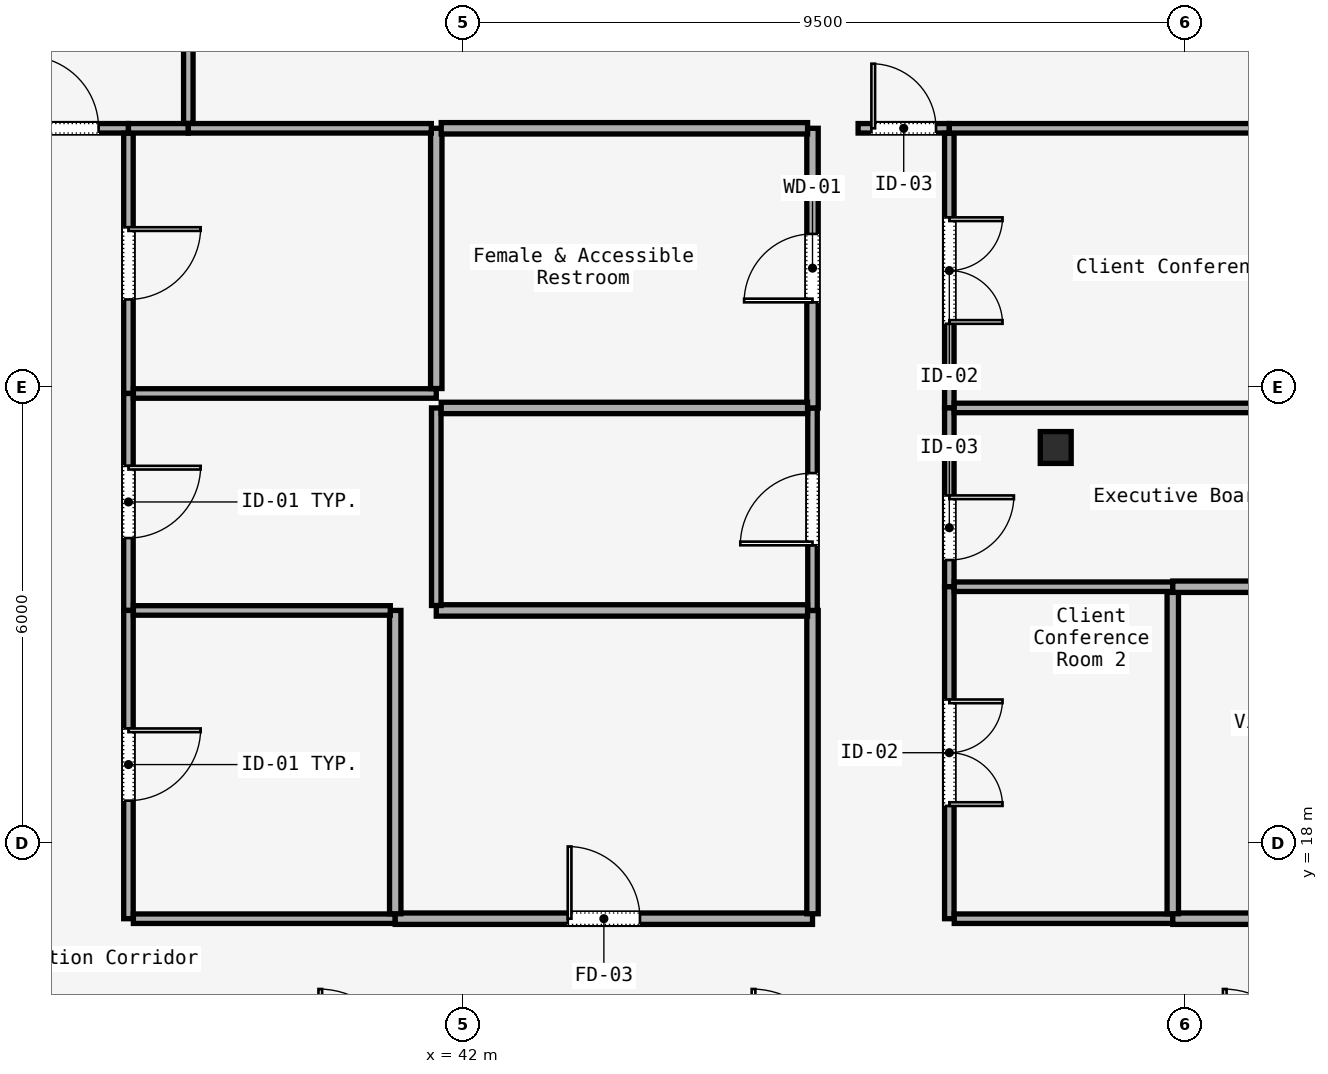
"""IFC4 building model, lengths in metres.
Left out: names, types, materials, properties, quantities, classifications, styles, units other than length and angle.
Written with IfcOpenShell. Run it as: python <this file> out.ifc"""

import sys

from ifc_helpers import new_model, si_unit, direction, frame, frame_2d, origin, origin_2d, place, context, subcontext, project, spatial, rectangle, i_section, extrude, element, fill, save


model = new_model("IFC4")
c1 = context("Model", 3, precision=1e-05, world=origin(), true_north=direction((0.0, 1.0)))
c2 = subcontext(c1, "Body", "Model", "MODEL_VIEW")
j1 = project(units=[si_unit("LENGTHUNIT", "METRE"), si_unit("PLANEANGLEUNIT", "RADIAN")], contexts=[c1])
p1 = place(None, origin())
s1 = spatial("IfcSite", under=j1, at=p1, CompositionType="ELEMENT")
p2 = place(p1, origin())
s2 = spatial("IfcBuilding", under=s1, at=p2, CompositionType="ELEMENT")
p3 = place(p2, frame((0.0, 0.0, 157.4)))
s3 = spatial("IfcBuildingStorey", under=s2, at=p3, CompositionType="ELEMENT", Elevation=157.4)
p4 = place(p3, frame((49.8, 23.2, 0.0), z_axis=(0.0, 0.0, 1.0), x_axis=(1.0, 0.0, 0.0)))
e1 = element("IfcColumn", 1, at=p4, inside=s3, PredefinedType="COLUMN", context=c2, shape_type="SweptSolid", body=[
    extrude(i_section(OverallWidth=0.407, OverallDepth=0.419, WebThickness=0.031, FlangeThickness=0.049, FilletRadius=0.015, at=origin_2d()), origin(), (0.0, 0.0, 1.0), 3.58),
])
p5 = place(p3, frame((35.865, 27.4, 0.0), z_axis=(0.0, 0.0, 1.0), x_axis=(1.0, 0.0, 0.0)))
e2 = element("IfcWall", 2, at=p5, inside=s3, PredefinedType="PARTITIONING", context=c2, shape_type="SweptSolid", body=[
    extrude(rectangle(XDim=1.735, YDim=0.125, at=frame_2d((0.868, 0.0))), origin(), (0.0, 0.0, 1.0), 3.01),
])
p6 = place(p5, frame((0.393, 0.0, 0.0)))
e3 = element("IfcOpeningElement", 3, at=p6, cuts=e2, PredefinedType="OPENING", context=c2, shape_type="SweptSolid", body=[
    extrude(rectangle(XDim=0.95, YDim=2.2, at=frame_2d((0.475, 1.1))), frame((0.0, 0.062, 0.0), z_axis=(0.0, -1.0, 0.0), x_axis=(1.0, 0.0, 0.0)), (0.0, 0.0, 1.0), 0.125),
])
p7 = place(p3, frame((37.6, 27.335, 0.0), z_axis=(0.0, 0.0, 1.0), x_axis=(0.0, -1.0, 0.0)))
e4 = element("IfcWall", 4, at=p7, inside=s3, PredefinedType="PARTITIONING", context=c2, shape_type="SweptSolid", body=[
    extrude(rectangle(XDim=3.424, YDim=0.125, at=frame_2d((1.712, 0.0))), origin(), (0.0, 0.0, 1.0), 3.01),
])
p8 = place(p7, frame((1.237, 0.0, 0.0)))
e5 = element("IfcOpeningElement", 5, at=p8, cuts=e4, PredefinedType="OPENING", context=c2, shape_type="SweptSolid", body=[
    extrude(rectangle(XDim=0.95, YDim=2.2, at=frame_2d((0.475, 1.1))), frame((0.0, 0.062, 0.0), z_axis=(0.0, -1.0, 0.0), x_axis=(1.0, 0.0, 0.0)), (0.0, 0.0, 1.0), 0.125),
])
p9 = place(p3, frame((37.6, 23.911, 0.0), z_axis=(0.0, 0.0, 1.0), x_axis=(0.0, -1.0, 0.0)))
e6 = element("IfcWall", 6, at=p9, inside=s3, PredefinedType="PARTITIONING", context=c2, shape_type="SweptSolid", body=[
    extrude(rectangle(XDim=2.855, YDim=0.125, at=frame_2d((1.427, 0.0))), origin(), (0.0, 0.0, 1.0), 3.01),
])
p10 = place(p9, frame((0.952, 0.0, 0.0)))
e7 = element("IfcOpeningElement", 7, at=p10, cuts=e6, PredefinedType="OPENING", context=c2, shape_type="SweptSolid", body=[
    extrude(rectangle(XDim=0.95, YDim=2.2, at=frame_2d((0.475, 1.1))), frame((0.0, 0.062, 0.0), z_axis=(0.0, -1.0, 0.0), x_axis=(1.0, 0.0, 0.0)), (0.0, 0.0, 1.0), 0.125),
])
p11 = place(p3, frame((37.6, 21.056, 0.0), z_axis=(0.0, 0.0, 1.0), x_axis=(0.0, -1.0, 0.0)))
e8 = element("IfcWall", 8, at=p11, inside=s3, PredefinedType="PARTITIONING", context=c2, shape_type="SweptSolid", body=[
    extrude(rectangle(XDim=4.056, YDim=0.125, at=frame_2d((2.028, 0.0))), origin(), (0.0, 0.0, 1.0), 3.01),
])
p12 = place(p11, frame((1.553, 0.0, 0.0)))
e9 = element("IfcOpeningElement", 9, at=p12, cuts=e8, PredefinedType="OPENING", context=c2, shape_type="SweptSolid", body=[
    extrude(rectangle(XDim=0.95, YDim=2.2, at=frame_2d((0.475, 1.1))), frame((0.0, 0.062, 0.0), z_axis=(0.0, -1.0, 0.0), x_axis=(1.0, 0.0, 0.0)), (0.0, 0.0, 1.0), 0.125),
])
p13 = place(p3, frame((37.665, 17.0, 0.0), z_axis=(0.0, 0.0, 1.0), x_axis=(1.0, 0.0, 0.0)))
e10 = element("IfcWall", 10, at=p13, inside=s3, PredefinedType="PARTITIONING", context=c2, shape_type="SweptSolid", body=[
    extrude(rectangle(XDim=3.445, YDim=0.125, at=frame_2d((1.723, 0.0))), origin(), (0.0, 0.0, 1.0), 3.01),
])
p14 = place(p3, frame((41.11, 17.0, 0.0), z_axis=(0.0, 0.0, 1.0), x_axis=(1.0, 0.0, 0.0)))
e11 = element("IfcWall", 11, at=p14, inside=s3, PredefinedType="PARTITIONING", context=c2, shape_type="SweptSolid", body=[
    extrude(rectangle(XDim=5.49, YDim=0.15, at=frame_2d((2.745, 0.0))), origin(), (0.0, 0.0, 1.0), 3.01),
])
p15 = place(p14, frame((2.27, 0.0, 0.0)))
e12 = element("IfcOpeningElement", 12, at=p15, cuts=e11, PredefinedType="OPENING", context=c2, shape_type="SweptSolid", body=[
    extrude(rectangle(XDim=0.95, YDim=2.2, at=frame_2d((0.475, 1.1))), frame((0.0, 0.075, 0.0), z_axis=(0.0, -1.0, 0.0), x_axis=(1.0, 0.0, 0.0)), (0.0, 0.0, 1.0), 0.15),
])
p16 = place(p3, frame((46.6, 17.065, 0.0), z_axis=(0.0, 0.0, 1.0), x_axis=(0.0, 1.0, 0.0)))
e13 = element("IfcWall", 13, at=p16, inside=s3, PredefinedType="PARTITIONING", context=c2, shape_type="SweptSolid", body=[
    extrude(rectangle(XDim=3.991, YDim=0.15, at=frame_2d((1.996, 0.0))), origin(), (0.0, 0.0, 1.0), 3.01),
])
p17 = place(p3, frame((46.6, 21.056, 0.0), z_axis=(0.0, 0.0, 1.0), x_axis=(0.0, 1.0, 0.0)))
e14 = element("IfcWall", 14, at=p17, inside=s3, PredefinedType="PARTITIONING", context=c2, shape_type="SweptSolid", body=[
    extrude(rectangle(XDim=2.665, YDim=0.125, at=frame_2d((1.332, 0.0))), origin(), (0.0, 0.0, 1.0), 3.01),
])
p18 = place(p17, frame((0.857, 0.0, 0.0)))
e15 = element("IfcOpeningElement", 15, at=p18, cuts=e14, PredefinedType="OPENING", context=c2, shape_type="SweptSolid", body=[
    extrude(rectangle(XDim=0.95, YDim=2.2, at=frame_2d((0.475, 1.1))), frame((0.0, 0.062, 0.0), z_axis=(0.0, -1.0, 0.0), x_axis=(1.0, 0.0, 0.0)), (0.0, 0.0, 1.0), 0.125),
])
p19 = place(p3, frame((46.6, 23.72, 0.0), z_axis=(0.0, 0.0, 1.0), x_axis=(0.0, 1.0, 0.0)))
e16 = element("IfcWall", 16, at=p19, inside=s3, PredefinedType="PARTITIONING", context=c2, shape_type="SweptSolid", body=[
    extrude(rectangle(XDim=3.679, YDim=0.15, at=frame_2d((1.84, 0.0))), origin(), (0.0, 0.0, 1.0), 3.01),
])
p20 = place(p19, frame((1.39, 0.0, 0.0)))
e17 = element("IfcOpeningElement", 17, at=p20, cuts=e16, PredefinedType="OPENING", context=c2, shape_type="SweptSolid", body=[
    extrude(rectangle(XDim=0.9, YDim=2.15, at=frame_2d((0.45, 1.075))), frame((0.0, 0.075, 0.0), z_axis=(0.0, -1.0, 0.0), x_axis=(1.0, 0.0, 0.0)), (0.0, 0.0, 1.0), 0.15),
])
p21 = place(p3, frame((47.2, 27.4, 0.0), z_axis=(0.0, 0.0, 1.0), x_axis=(1.0, 0.0, 0.0)))
e18 = element("IfcWall", 18, at=p21, inside=s3, PredefinedType="PARTITIONING", context=c2, shape_type="SweptSolid", body=[
    extrude(rectangle(XDim=1.2, YDim=0.125, at=frame_2d((0.6, 0.0))), origin(), (0.0, 0.0, 1.0), 3.01),
])
p22 = place(p21, frame((0.175, 0.0, 0.0)))
e19 = element("IfcOpeningElement", 19, at=p22, cuts=e18, PredefinedType="OPENING", context=c2, shape_type="SweptSolid", body=[
    extrude(rectangle(XDim=0.85, YDim=2.15, at=frame_2d((0.425, 1.075))), frame((0.0, 0.062, 0.0), z_axis=(0.0, -1.0, 0.0), x_axis=(1.0, 0.0, 0.0)), (0.0, 0.0, 1.0), 0.125),
])
p23 = place(p3, frame((48.4, 27.335, 0.0), z_axis=(0.0, 0.0, 1.0), x_axis=(0.0, -1.0, 0.0)))
e20 = element("IfcWall", 20, at=p23, inside=s3, PredefinedType="PARTITIONING", context=c2, shape_type="SweptSolid", body=[
    extrude(rectangle(XDim=3.615, YDim=0.125, at=frame_2d((1.807, 0.0))), origin(), (0.0, 0.0, 1.0), 3.01),
])
p24 = place(p23, frame((1.107, 0.0, 0.0)))
e21 = element("IfcOpeningElement", 21, at=p24, cuts=e20, PredefinedType="OPENING", context=c2, shape_type="SweptSolid", body=[
    extrude(rectangle(XDim=1.4, YDim=2.2, at=frame_2d((0.7, 1.1))), frame((0.0, 0.062, 0.0), z_axis=(0.0, -1.0, 0.0), x_axis=(1.0, 0.0, 0.0)), (0.0, 0.0, 1.0), 0.125),
])
p25 = place(p3, frame((48.4, 23.72, 0.0), z_axis=(0.0, 0.0, 1.0), x_axis=(0.0, -1.0, 0.0)))
e22 = element("IfcWall", 22, at=p25, inside=s3, PredefinedType="PARTITIONING", context=c2, shape_type="SweptSolid", body=[
    extrude(rectangle(XDim=2.353, YDim=0.125, at=frame_2d((1.176, 0.0))), origin(), (0.0, 0.0, 1.0), 3.01),
])
p26 = place(p25, frame((1.151, 0.0, 0.0)))
e23 = element("IfcOpeningElement", 23, at=p26, cuts=e22, PredefinedType="OPENING", context=c2, shape_type="SweptSolid", body=[
    extrude(rectangle(XDim=0.85, YDim=2.15, at=frame_2d((0.425, 1.075))), frame((0.0, 0.062, 0.0), z_axis=(0.0, -1.0, 0.0), x_axis=(1.0, 0.0, 0.0)), (0.0, 0.0, 1.0), 0.125),
])
p27 = place(p3, frame((48.4, 21.368, 0.0), z_axis=(0.0, 0.0, 1.0), x_axis=(0.0, -1.0, 0.0)))
e24 = element("IfcWall", 24, at=p27, inside=s3, PredefinedType="PARTITIONING", context=c2, shape_type="SweptSolid", body=[
    extrude(rectangle(XDim=4.368, YDim=0.125, at=frame_2d((2.184, 0.0))), origin(), (0.0, 0.0, 1.0), 3.01),
])
p28 = place(p27, frame((1.484, 0.0, 0.0)))
e25 = element("IfcOpeningElement", 25, at=p28, cuts=e24, PredefinedType="OPENING", context=c2, shape_type="SweptSolid", body=[
    extrude(rectangle(XDim=1.4, YDim=2.2, at=frame_2d((0.7, 1.1))), frame((0.0, 0.062, 0.0), z_axis=(0.0, -1.0, 0.0), x_axis=(1.0, 0.0, 0.0)), (0.0, 0.0, 1.0), 0.125),
])
p29 = place(p3, frame((48.465, 17.0, 0.0), z_axis=(0.0, 0.0, 1.0), x_axis=(1.0, 0.0, 0.0)))
e26 = element("IfcWall", 26, at=p29, inside=s3, PredefinedType="PARTITIONING", context=c2, shape_type="SweptSolid", body=[
    extrude(rectangle(XDim=2.875, YDim=0.125, at=frame_2d((1.438, 0.0))), origin(), (0.0, 0.0, 1.0), 3.01),
])
p30 = place(p3, frame((51.34, 17.0, 0.0), z_axis=(0.0, 0.0, 1.0), x_axis=(1.0, 0.0, 0.0)))
e27 = element("IfcWall", 27, at=p30, inside=s3, PredefinedType="PARTITIONING", context=c2, shape_type="SweptSolid", body=[
    extrude(rectangle(XDim=4.06, YDim=0.15, at=frame_2d((2.03, 0.0))), origin(), (0.0, 0.0, 1.0), 3.01),
])
p31 = place(p30, frame((1.58, 0.0, 0.0)))
e28 = element("IfcOpeningElement", 28, at=p31, cuts=e27, PredefinedType="OPENING", context=c2, shape_type="SweptSolid", body=[
    extrude(rectangle(XDim=0.9, YDim=2.15, at=frame_2d((0.45, 1.075))), frame((0.0, 0.075, 0.0), z_axis=(0.0, -1.0, 0.0), x_axis=(1.0, 0.0, 0.0)), (0.0, 0.0, 1.0), 0.15),
])
p32 = place(p3, frame((41.11, 21.056, 0.0), z_axis=(0.0, 0.0, 1.0), x_axis=(0.0, -1.0, 0.0)))
e29 = element("IfcWall", 29, at=p32, inside=s3, PredefinedType="PARTITIONING", context=c2, shape_type="SweptSolid", body=[
    extrude(rectangle(XDim=3.991, YDim=0.15, at=frame_2d((1.996, 0.0))), origin(), (0.0, 0.0, 1.0), 3.01),
])
p33 = place(p3, frame((37.665, 21.056, 0.0), z_axis=(0.0, 0.0, 1.0), x_axis=(1.0, 0.0, 0.0)))
e30 = element("IfcWall", 30, at=p33, inside=s3, PredefinedType="PARTITIONING", context=c2, shape_type="SweptSolid", body=[
    extrude(rectangle(XDim=3.38, YDim=0.125, at=frame_2d((1.69, 0.0))), origin(), (0.0, 0.0, 1.0), 3.01),
])
p34 = place(p3, frame((41.65, 21.056, 0.0), z_axis=(0.0, 0.0, 1.0), x_axis=(1.0, 0.0, 0.0)))
e31 = element("IfcWall", 31, at=p34, inside=s3, PredefinedType="PARTITIONING", context=c2, shape_type="SweptSolid", body=[
    extrude(rectangle(XDim=4.885, YDim=0.15, at=frame_2d((2.442, 0.0))), origin(), (0.0, 0.0, 1.0), 3.01),
])
p35 = place(p3, frame((48.465, 21.368, 0.0), z_axis=(0.0, 0.0, 1.0), x_axis=(1.0, 0.0, 0.0)))
e32 = element("IfcWall", 32, at=p35, inside=s3, PredefinedType="PARTITIONING", context=c2, shape_type="SweptSolid", body=[
    extrude(rectangle(XDim=2.875, YDim=0.125, at=frame_2d((1.438, 0.0))), origin(), (0.0, 0.0, 1.0), 3.01),
])
p36 = place(p3, frame((51.34, 21.303, 0.0), z_axis=(0.0, 0.0, 1.0), x_axis=(0.0, -1.0, 0.0)))
e33 = element("IfcWall", 33, at=p36, inside=s3, PredefinedType="PARTITIONING", context=c2, shape_type="SweptSolid", body=[
    extrude(rectangle(XDim=4.238, YDim=0.15, at=frame_2d((2.119, 0.0))), origin(), (0.0, 0.0, 1.0), 3.01),
])
p37 = place(p3, frame((51.34, 21.368, 0.0), z_axis=(0.0, 0.0, 1.0), x_axis=(1.0, 0.0, 0.0)))
e34 = element("IfcWall", 34, at=p37, inside=s3, PredefinedType="PARTITIONING", context=c2, shape_type="SweptSolid", body=[
    extrude(rectangle(XDim=3.995, YDim=0.15, at=frame_2d((1.998, 0.0))), origin(), (0.0, 0.0, 1.0), 3.01),
])
p38 = place(p3, frame((41.65, 21.121, 0.0), z_axis=(0.0, 0.0, 1.0), x_axis=(0.0, 1.0, 0.0)))
e35 = element("IfcWall", 35, at=p38, inside=s3, PredefinedType="PARTITIONING", context=c2, shape_type="SweptSolid", body=[
    extrude(rectangle(XDim=2.599, YDim=0.125, at=frame_2d((1.3, 0.0))), origin(), (0.0, 0.0, 1.0), 3.01),
])
p39 = place(p3, frame((41.715, 23.72, 0.0), z_axis=(0.0, 0.0, 1.0), x_axis=(1.0, 0.0, 0.0)))
e36 = element("IfcWall", 36, at=p39, inside=s3, PredefinedType="PARTITIONING", context=c2, shape_type="SweptSolid", body=[
    extrude(rectangle(XDim=4.82, YDim=0.15, at=frame_2d((2.41, 0.0))), origin(), (0.0, 0.0, 1.0), 3.01),
])
p40 = place(p3, frame((37.665, 23.911, 0.0), z_axis=(0.0, 0.0, 1.0), x_axis=(1.0, 0.0, 0.0)))
e37 = element("IfcWall", 37, at=p40, inside=s3, PredefinedType="PARTITIONING", context=c2, shape_type="SweptSolid", body=[
    extrude(rectangle(XDim=3.985, YDim=0.125, at=frame_2d((1.992, 0.0))), origin(), (0.0, 0.0, 1.0), 3.01),
])
p41 = place(p3, frame((48.465, 23.72, 0.0), z_axis=(0.0, 0.0, 1.0), x_axis=(1.0, 0.0, 0.0)))
e38 = element("IfcWall", 38, at=p41, inside=s3, PredefinedType="PARTITIONING", context=c2, shape_type="SweptSolid", body=[
    extrude(rectangle(XDim=6.87, YDim=0.125, at=frame_2d((3.435, 0.0))), origin(), (0.0, 0.0, 1.0), 3.01),
])
p42 = place(p3, frame((41.65, 23.976, 0.0), z_axis=(0.0, 0.0, 1.0), x_axis=(0.0, 1.0, 0.0)))
e39 = element("IfcWall", 39, at=p42, inside=s3, PredefinedType="PARTITIONING", context=c2, shape_type="SweptSolid", body=[
    extrude(rectangle(XDim=3.424, YDim=0.15, at=frame_2d((1.712, 0.0))), origin(), (0.0, 0.0, 1.0), 3.01),
])
p43 = place(p3, frame((41.715, 27.4, 0.0), z_axis=(0.0, 0.0, 1.0), x_axis=(1.0, 0.0, 0.0)))
e40 = element("IfcWall", 40, at=p43, inside=s3, PredefinedType="PARTITIONING", context=c2, shape_type="SweptSolid", body=[
    extrude(rectangle(XDim=4.82, YDim=0.15, at=frame_2d((2.41, 0.0))), origin(), (0.0, 0.0, 1.0), 3.01),
])
p44 = place(p3, frame((48.4, 27.4, 0.0), z_axis=(0.0, 0.0, 1.0), x_axis=(1.0, 0.0, 0.0)))
e41 = element("IfcWall", 41, at=p44, inside=s3, PredefinedType="PARTITIONING", context=c2, shape_type="SweptSolid", body=[
    extrude(rectangle(XDim=6.935, YDim=0.125, at=frame_2d((3.468, 0.0))), origin(), (0.0, 0.0, 1.0), 3.01),
])
p45 = place(p3, frame((37.6, 27.4, 0.0), z_axis=(0.0, 0.0, 1.0), x_axis=(1.0, 0.0, 0.0)))
e42 = element("IfcWall", 42, at=p45, inside=s3, PredefinedType="PARTITIONING", context=c2, shape_type="SweptSolid", body=[
    extrude(rectangle(XDim=0.788, YDim=0.125, at=frame_2d((0.394, 0.0))), origin(), (0.0, 0.0, 1.0), 3.01),
])
p46 = place(p3, frame((38.388, 27.4, 0.0), z_axis=(0.0, 0.0, 1.0), x_axis=(1.0, 0.0, 0.0)))
e43 = element("IfcWall", 43, at=p46, inside=s3, PredefinedType="PARTITIONING", context=c2, shape_type="SweptSolid", body=[
    extrude(rectangle(XDim=3.197, YDim=0.125, at=frame_2d((1.599, 0.0))), origin(), (0.0, 0.0, 1.0), 3.01),
])
p47 = place(p3, frame((38.388, 46.154, 0.0), z_axis=(0.0, 0.0, 1.0), x_axis=(0.0, -1.0, 0.0)))
e44 = element("IfcWall", 44, at=p47, inside=s3, PredefinedType="PARTITIONING", context=c2, shape_type="SweptSolid", body=[
    extrude(rectangle(XDim=18.689, YDim=0.125, at=frame_2d((9.344, 0.0))), origin(), (0.0, 0.0, 1.0), 3.01),
])
p48 = place(p12, origin())
e45 = element("IfcDoor", 45, at=p48, inside=s3, OperationType="SINGLE_SWING_RIGHT", PredefinedType="DOOR", context=c2, shape_type="SweptSolid", body=[
    extrude(rectangle(XDim=0.95, YDim=2.2, at=frame_2d((0.475, 1.1))), frame((0.0, 0.025, 0.0), z_axis=(0.0, -1.0, 0.0), x_axis=(1.0, 0.0, 0.0)), (0.0, 0.0, 1.0), 0.05),
])
fill(e9, e45)
p49 = place(p15, origin())
e46 = element("IfcDoor", 46, at=p49, inside=s3, OperationType="SINGLE_SWING_LEFT", PredefinedType="DOOR", context=c2, shape_type="SweptSolid", body=[
    extrude(rectangle(XDim=0.95, YDim=2.2, at=frame_2d((0.475, 1.1))), frame((0.0, 0.025, 0.0), z_axis=(0.0, -1.0, 0.0), x_axis=(1.0, 0.0, 0.0)), (0.0, 0.0, 1.0), 0.05),
])
fill(e12, e46)
p50 = place(p28, origin())
e47 = element("IfcDoor", 47, at=p50, inside=s3, OperationType="SINGLE_SWING_RIGHT", PredefinedType="DOOR", context=c2, shape_type="SweptSolid", body=[
    extrude(rectangle(XDim=1.4, YDim=2.2, at=frame_2d((0.7, 1.1))), frame((0.0, 0.025, 0.0), z_axis=(0.0, -1.0, 0.0), x_axis=(1.0, 0.0, 0.0)), (0.0, 0.0, 1.0), 0.05),
])
fill(e25, e47)
p51 = place(p18, origin())
e48 = element("IfcDoor", 48, at=p51, inside=s3, OperationType="SINGLE_SWING_LEFT", PredefinedType="DOOR", context=c2, shape_type="SweptSolid", body=[
    extrude(rectangle(XDim=0.95, YDim=2.2, at=frame_2d((0.475, 1.1))), frame((0.0, 0.025, 0.0), z_axis=(0.0, -1.0, 0.0), x_axis=(1.0, 0.0, 0.0)), (0.0, 0.0, 1.0), 0.05),
])
fill(e15, e48)
p52 = place(p10, origin())
e49 = element("IfcDoor", 49, at=p52, inside=s3, OperationType="SINGLE_SWING_RIGHT", PredefinedType="DOOR", context=c2, shape_type="SweptSolid", body=[
    extrude(rectangle(XDim=0.95, YDim=2.2, at=frame_2d((0.475, 1.1))), frame((0.0, 0.025, 0.0), z_axis=(0.0, -1.0, 0.0), x_axis=(1.0, 0.0, 0.0)), (0.0, 0.0, 1.0), 0.05),
])
fill(e7, e49)
p53 = place(p26, origin())
e50 = element("IfcDoor", 50, at=p53, inside=s3, OperationType="SINGLE_SWING_LEFT", PredefinedType="DOOR", context=c2, shape_type="SweptSolid", body=[
    extrude(rectangle(XDim=0.85, YDim=2.15, at=frame_2d((0.425, 1.075))), frame((0.0, 0.025, 0.0), z_axis=(0.0, -1.0, 0.0), x_axis=(1.0, 0.0, 0.0)), (0.0, 0.0, 1.0), 0.05),
])
fill(e23, e50)
p54 = place(p20, origin())
e51 = element("IfcDoor", 51, at=p54, inside=s3, OperationType="SINGLE_SWING_LEFT", PredefinedType="DOOR", context=c2, shape_type="SweptSolid", body=[
    extrude(rectangle(XDim=0.9, YDim=2.15, at=frame_2d((0.45, 1.075))), frame((0.0, 0.025, 0.0), z_axis=(0.0, -1.0, 0.0), x_axis=(1.0, 0.0, 0.0)), (0.0, 0.0, 1.0), 0.05),
])
fill(e17, e51)
p55 = place(p24, origin())
e52 = element("IfcDoor", 52, at=p55, inside=s3, OperationType="SINGLE_SWING_RIGHT", PredefinedType="DOOR", context=c2, shape_type="SweptSolid", body=[
    extrude(rectangle(XDim=1.4, YDim=2.2, at=frame_2d((0.7, 1.1))), frame((0.0, 0.025, 0.0), z_axis=(0.0, -1.0, 0.0), x_axis=(1.0, 0.0, 0.0)), (0.0, 0.0, 1.0), 0.05),
])
fill(e21, e52)
p56 = place(p8, origin())
e53 = element("IfcDoor", 53, at=p56, inside=s3, OperationType="SINGLE_SWING_LEFT", PredefinedType="DOOR", context=c2, shape_type="SweptSolid", body=[
    extrude(rectangle(XDim=0.95, YDim=2.2, at=frame_2d((0.475, 1.1))), frame((0.0, 0.025, 0.0), z_axis=(0.0, -1.0, 0.0), x_axis=(1.0, 0.0, 0.0)), (0.0, 0.0, 1.0), 0.05),
])
fill(e5, e53)
p57 = place(p6, origin())
e54 = element("IfcDoor", 54, at=p57, inside=s3, OperationType="SINGLE_SWING_LEFT", PredefinedType="DOOR", context=c2, shape_type="SweptSolid", body=[
    extrude(rectangle(XDim=0.95, YDim=2.2, at=frame_2d((0.475, 1.1))), frame((0.0, 0.025, 0.0), z_axis=(0.0, -1.0, 0.0), x_axis=(1.0, 0.0, 0.0)), (0.0, 0.0, 1.0), 0.05),
])
fill(e3, e54)
p58 = place(p22, origin())
e55 = element("IfcDoor", 55, at=p58, inside=s3, OperationType="SINGLE_SWING_LEFT", PredefinedType="DOOR", context=c2, shape_type="SweptSolid", body=[
    extrude(rectangle(XDim=0.85, YDim=2.15, at=frame_2d((0.425, 1.075))), frame((0.0, 0.025, 0.0), z_axis=(0.0, -1.0, 0.0), x_axis=(1.0, 0.0, 0.0)), (0.0, 0.0, 1.0), 0.05),
])
fill(e19, e55)
save(model, sys.argv[1])
